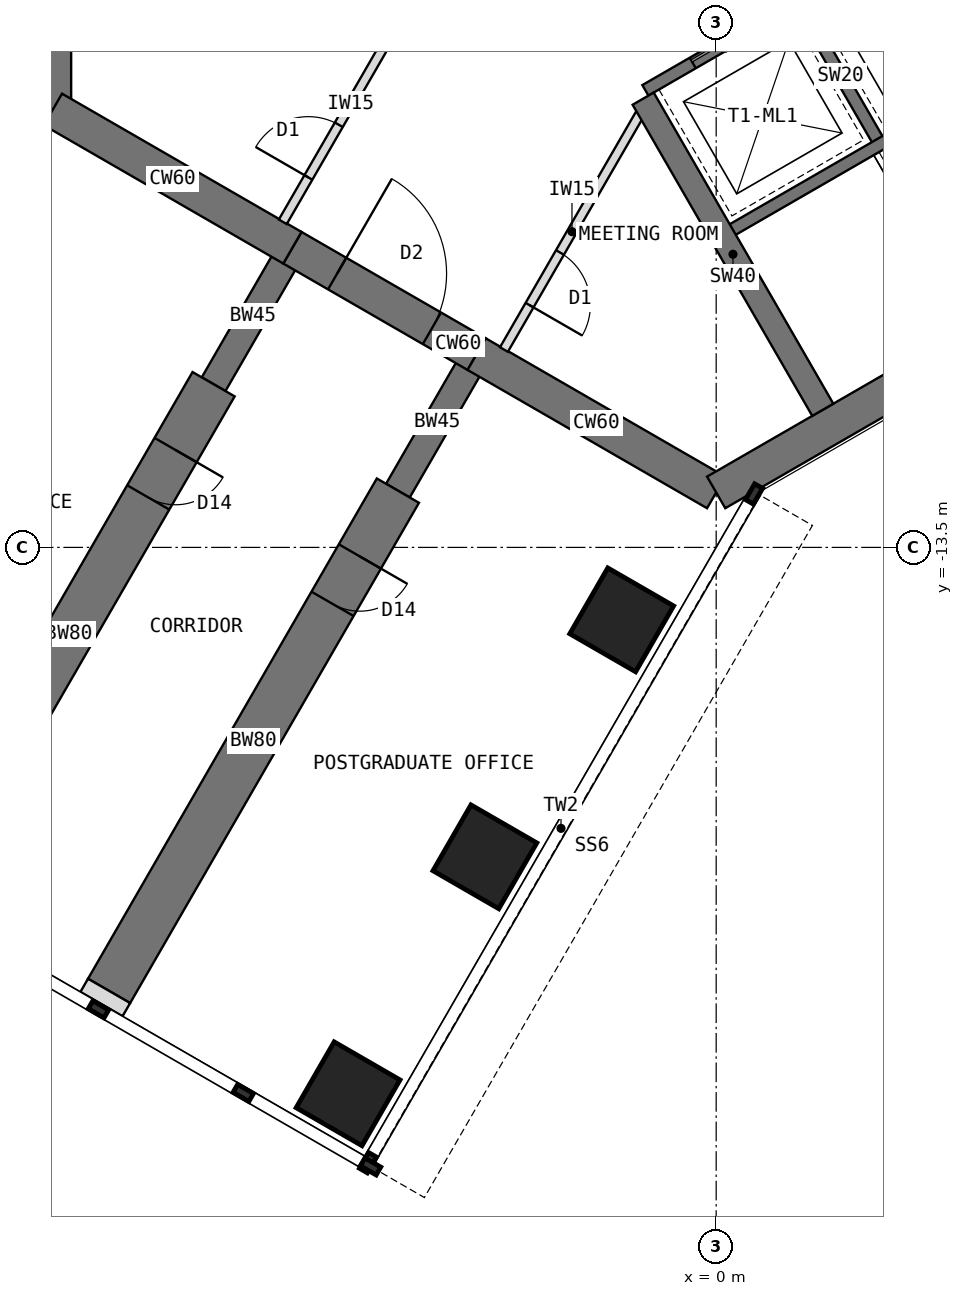
"""IFC4 building model, lengths in metres.
Left out: names, types, materials, properties, quantities, classifications, styles, units other than length and angle.
Written with IfcOpenShell. Run it as: python <this file> out.ifc"""

import sys

from ifc_helpers import new_model, si_unit, direction, frame, frame_2d, origin, origin_2d, place, context, subcontext, project, spatial, rectangle, extrude, element, fill, save


model = new_model("IFC4")
c1 = context("Model", 3, precision=1e-05, world=origin(), true_north=direction((0.0, 1.0)))
c2 = subcontext(c1, "Body", "Model", "MODEL_VIEW")
j1 = project(units=[si_unit("LENGTHUNIT", "METRE"), si_unit("PLANEANGLEUNIT", "RADIAN")], contexts=[c1])
p1 = place(None, origin())
s1 = spatial("IfcSite", under=j1, at=p1, CompositionType="ELEMENT")
p2 = place(p1, origin())
s2 = spatial("IfcBuilding", under=s1, at=p2, CompositionType="ELEMENT")
p3 = place(p2, frame((0.0, 0.0, 157.5)))
s3 = spatial("IfcBuildingStorey", under=s2, at=p3, CompositionType="ELEMENT", Elevation=157.5)
p4 = place(p3, frame((-10.908, 6.298, 0.0), z_axis=(0.0, 0.0, 1.0), x_axis=(0.0, -1.0, 0.0)))
e1 = element("IfcWall", 1, at=p4, inside=s3, PredefinedType="SHEAR", context=c2, shape_type="SweptSolid", body=[
    extrude(rectangle(XDim=12.596, YDim=0.6, at=frame_2d((6.298, 0.0))), origin(), (0.0, 0.0, 1.0), 4.0),
])
p5 = place(p3, frame((-10.908, -6.298, 0.0), z_axis=(0.0, 0.0, 1.0), x_axis=(0.866034513004, -0.499984222037, 0.0)))
e2 = element("IfcWall", 2, at=p5, inside=s3, PredefinedType="SHEAR", context=c2, shape_type="SweptSolid", body=[
    extrude(rectangle(XDim=4.548, YDim=0.6, at=frame_2d((2.274, 0.0))), origin(), (0.0, 0.0, 1.0), 4.0),
])
p6 = place(p3, frame((-6.97, -8.572, 0.0), z_axis=(0.0, 0.0, 1.0), x_axis=(0.866019471182, -0.500010275428, 0.0)))
e3 = element("IfcWall", 3, at=p6, inside=s3, PredefinedType="SHEAR", context=c2, shape_type="SweptSolid", body=[
    extrude(rectangle(XDim=3.5, YDim=0.6, at=frame_2d((1.75, 0.0))), origin(), (0.0, 0.0, 1.0), 4.0),
])
p7 = place(p6, frame((0.85, 0.0, 0.0)))
e4 = element("IfcOpeningElement", 4, at=p7, cuts=e3, PredefinedType="OPENING", context=c2, shape_type="SweptSolid", body=[
    extrude(rectangle(XDim=1.8, YDim=2.1, at=frame_2d((0.9, 1.05))), frame((0.0, 0.31, 0.0), z_axis=(0.0, -1.0, 0.0), x_axis=(1.0, 0.0, 0.0)), (0.0, 0.0, 1.0), 0.62),
])
p8 = place(p3, frame((-3.939, -10.322, 0.0), z_axis=(0.0, 0.0, 1.0), x_axis=(0.866011268655, -0.500024481964, 0.0)))
e5 = element("IfcWall", 5, at=p8, inside=s3, PredefinedType="SHEAR", context=c2, shape_type="SweptSolid", body=[
    extrude(rectangle(XDim=4.548, YDim=0.6, at=frame_2d((2.274, 0.0))), origin(), (0.0, 0.0, 1.0), 4.0),
])
p9 = place(p3, frame((0.0, -12.596, 0.0), z_axis=(0.0, 0.0, 1.0), x_axis=(0.866021940709, 0.500005998175, 0.0)))
e6 = element("IfcWall", 6, at=p9, inside=s3, PredefinedType="SHEAR", context=c2, shape_type="SweptSolid", body=[
    extrude(rectangle(XDim=12.596, YDim=0.6, at=frame_2d((6.298, 0.0))), origin(), (0.0, 0.0, 1.0), 4.0),
])
p10 = place(p3, frame((-3.939, -10.322, 0.0), z_axis=(0.0, 0.0, 1.0), x_axis=(-0.499918158782, -0.866072649678, 0.0)))
e7 = element("IfcWall", 7, at=p10, inside=s3, PredefinedType="SHEAR", context=c2, shape_type="SweptSolid", body=[
    extrude(rectangle(XDim=2.592, YDim=0.45, at=frame_2d((1.296, 0.0))), origin(), (0.0, 0.0, 1.0), 4.0),
])
p11 = place(p3, frame((-5.234, -12.566, 0.0), z_axis=(0.0, 0.0, 1.0), x_axis=(-0.499997557548, -0.86602681393, 0.0)))
e8 = element("IfcWall", 8, at=p11, inside=s3, PredefinedType="SHEAR", context=c2, shape_type="SweptSolid", body=[
    extrude(rectangle(XDim=9.5, YDim=0.8, at=frame_2d((4.75, 0.0))), origin(), (0.0, 0.0, 1.0), 4.0),
])
p12 = place(p11, frame((1.25, 0.0, 0.0)))
e9 = element("IfcOpeningElement", 9, at=p12, cuts=e8, PredefinedType="OPENING", context=c2, shape_type="SweptSolid", body=[
    extrude(rectangle(XDim=0.9, YDim=2.1, at=frame_2d((0.45, 1.05))), frame((0.0, 0.41, 0.0), z_axis=(0.0, -1.0, 0.0), x_axis=(1.0, 0.0, 0.0)), (0.0, 0.0, 1.0), 0.82),
])
p13 = place(p3, frame((-6.97, -8.572, 0.0), z_axis=(0.0, 0.0, 1.0), x_axis=(-0.499988811324, -0.866031863473, 0.0)))
e10 = element("IfcWall", 10, at=p13, inside=s3, PredefinedType="SHEAR", context=c2, shape_type="SweptSolid", body=[
    extrude(rectangle(XDim=2.592, YDim=0.45, at=frame_2d((1.296, 0.0))), origin(), (0.0, 0.0, 1.0), 4.0),
])
p14 = place(p3, frame((-8.266, -10.816, 0.0), z_axis=(0.0, 0.0, 1.0), x_axis=(-0.499997557548, -0.86602681393, 0.0)))
e11 = element("IfcWall", 11, at=p14, inside=s3, PredefinedType="SHEAR", context=c2, shape_type="SweptSolid", body=[
    extrude(rectangle(XDim=9.5, YDim=0.8, at=frame_2d((4.75, 0.0))), origin(), (0.0, 0.0, 1.0), 4.0),
])
p15 = place(p14, frame((1.25, 0.0, 0.0)))
e12 = element("IfcOpeningElement", 12, at=p15, cuts=e11, PredefinedType="OPENING", context=c2, shape_type="SweptSolid", body=[
    extrude(rectangle(XDim=0.9, YDim=2.1, at=frame_2d((0.45, 1.05))), frame((0.0, 0.41, 0.0), z_axis=(0.0, -1.0, 0.0), x_axis=(1.0, 0.0, 0.0)), (0.0, 0.0, 1.0), 0.82),
])
for number, where, z_axis, x_axis in (
    (13, (-1.554, -14.691, 0.0), (0.0, 0.0, 1.0), (0.5, 0.866, 0.0)),
    (14, (-3.804, -18.588, 0.0), (0.0, 0.0, 1.0), (0.5, 0.866, 0.0)),
    (15, (-6.054, -22.486, 0.0), (0.0, 0.0, 1.0), (0.5, 0.866, 0.0)),
):
    element("IfcColumn", number, at=place(p3, frame(where, z_axis=z_axis, x_axis=x_axis)), inside=s3, PredefinedType="COLUMN", context=c2, shape_type="SweptSolid", body=[
        extrude(rectangle(XDim=1.25, YDim=1.25, at=origin_2d()), origin(), (0.0, 0.0, 1.0), 4.0),
    ])
p16 = place(p3, frame((-9.984, -20.794, 0.0), z_axis=(0.0, 0.0, 1.0), x_axis=(-0.500342721131, -0.865827443207, 0.0)))
e16 = element("IfcWall", 16, at=p16, inside=s3, PredefinedType="PARTITIONING", context=c2, shape_type="SweptSolid", body=[
    extrude(rectangle(XDim=0.25, YDim=0.8, at=frame_2d((0.125, 0.0))), origin(), (0.0, 0.0, 1.0), 3.8),
])
p17 = place(p3, frame((-1.164, -5.984, 0.0), z_axis=(0.0, 0.0, 1.0), x_axis=(0.866026010844, 0.49999894854, 0.0)))
e17 = element("IfcWall", 17, at=p17, inside=s3, PredefinedType="SHEAR", context=c2, shape_type="SweptSolid", body=[
    extrude(rectangle(XDim=8.0, YDim=0.2, at=frame_2d((4.0, 0.0))), origin(), (0.0, 0.0, 1.0), 4.0),
])
p18 = place(p17, frame((6.3, 0.0, 0.0)))
e18 = element("IfcOpeningElement", 18, at=p18, cuts=e17, PredefinedType="OPENING", context=c2, shape_type="SweptSolid", body=[
    extrude(rectangle(XDim=1.2, YDim=2.1, at=frame_2d((0.6, 1.05))), frame((0.0, 0.11, 0.0), z_axis=(0.0, -1.0, 0.0), x_axis=(1.0, 0.0, 0.0)), (0.0, 0.0, 1.0), 0.22),
])
p19 = place(p17, frame((0.9, 0.0, 0.0)))
e19 = element("IfcOpeningElement", 19, at=p19, cuts=e17, PredefinedType="OPENING", context=c2, shape_type="SweptSolid", body=[
    extrude(rectangle(XDim=1.1, YDim=2.2, at=frame_2d((0.55, 1.1))), frame((0.0, 0.11, 0.0), z_axis=(0.0, -1.0, 0.0), x_axis=(1.0, 0.0, 0.0)), (0.0, 0.0, 1.0), 0.22),
])
p20 = place(p17, frame((3.8, 0.0, 0.0)))
e20 = element("IfcOpeningElement", 20, at=p20, cuts=e17, PredefinedType="OPENING", context=c2, shape_type="SweptSolid", body=[
    extrude(rectangle(XDim=1.1, YDim=2.2, at=frame_2d((0.55, 1.1))), frame((0.0, 0.11, 0.0), z_axis=(0.0, -1.0, 0.0), x_axis=(1.0, 0.0, 0.0)), (0.0, 0.0, 1.0), 0.22),
])
p21 = place(p3, frame((1.397, -4.62, 0.0), z_axis=(0.0, 0.0, 1.0), x_axis=(0.499936506574, -0.866062058628, 0.0)))
e21 = element("IfcWall", 21, at=p21, inside=s3, PredefinedType="SHEAR", context=c2, shape_type="SweptSolid", body=[
    extrude(rectangle(XDim=2.6, YDim=0.2, at=frame_2d((1.3, 0.0))), origin(), (0.0, 0.0, 1.0), 4.0),
])
p22 = place(p3, frame((0.186, -8.322, 0.0), z_axis=(0.0, 0.0, 1.0), x_axis=(0.866026010844, 0.49999894854, 0.0)))
e22 = element("IfcWall", 22, at=p22, inside=s3, PredefinedType="SHEAR", context=c2, shape_type="SweptSolid", body=[
    extrude(rectangle(XDim=8.0, YDim=0.2, at=frame_2d((4.0, 0.0))), origin(), (0.0, 0.0, 1.0), 4.0),
])
p23 = place(p22, frame((6.7, 0.0, 0.0)))
e23 = element("IfcOpeningElement", 23, at=p23, cuts=e22, PredefinedType="OPENING", context=c2, shape_type="SweptSolid", body=[
    extrude(rectangle(XDim=1.1, YDim=2.1, at=frame_2d((0.55, 1.05))), frame((0.0, 0.11, 0.0), z_axis=(0.0, -1.0, 0.0), x_axis=(1.0, 0.0, 0.0)), (0.0, 0.0, 1.0), 0.22),
])
p24 = place(p3, frame((-1.201, -6.12, 0.0), z_axis=(0.0, 0.0, 1.0), x_axis=(0.49999668571, -0.866027317282, 0.0)))
e24 = element("IfcWall", 24, at=p24, inside=s3, PredefinedType="SHEAR", context=c2, shape_type="SweptSolid", body=[
    extrude(rectangle(XDim=5.908, YDim=0.4, at=frame_2d((2.954, 0.0))), origin(), (0.0, 0.0, 1.0), 4.0),
])
p25 = place(p3, frame((-1.253, -6.37, 0.0), z_axis=(0.0, 0.0, 1.0), x_axis=(-0.499999473313, -0.866025707867, 0.0)))
e25 = element("IfcWall", 25, at=p25, inside=s3, PredefinedType="PARTITIONING", context=c2, shape_type="SweptSolid", body=[
    extrude(rectangle(XDim=4.476, YDim=0.15, at=frame_2d((2.238, 0.0))), origin(), (0.0, 0.0, 1.0), 3.8),
])
p26 = place(p25, frame((2.633, 0.0, 0.0)))
e26 = element("IfcOpeningElement", 26, at=p26, cuts=e25, PredefinedType="OPENING", context=c2, shape_type="SweptSolid", body=[
    extrude(rectangle(XDim=1.0, YDim=2.1, at=frame_2d((0.5, 1.05))), frame((0.0, 0.085, 0.0), z_axis=(0.0, -1.0, 0.0), x_axis=(1.0, 0.0, 0.0)), (0.0, 0.0, 1.0), 0.17),
])
p27 = place(p3, frame((-7.128, -8.146, 0.0), z_axis=(0.0, 0.0, 1.0), x_axis=(0.499999473313, 0.866025707867, 0.0)))
e27 = element("IfcWall", 27, at=p27, inside=s3, PredefinedType="PARTITIONING", context=c2, shape_type="SweptSolid", body=[
    extrude(rectangle(XDim=4.476, YDim=0.15, at=frame_2d((2.238, 0.0))), origin(), (0.0, 0.0, 1.0), 3.8),
])
p28 = place(p27, frame((0.843, 0.0, 0.0)))
e28 = element("IfcOpeningElement", 28, at=p28, cuts=e27, PredefinedType="OPENING", context=c2, shape_type="SweptSolid", body=[
    extrude(rectangle(XDim=1.0, YDim=2.1, at=frame_2d((0.5, 1.05))), frame((0.0, 0.085, 0.0), z_axis=(0.0, -1.0, 0.0), x_axis=(1.0, 0.0, 0.0)), (0.0, 0.0, 1.0), 0.17),
])
p29 = place(p19, origin())
e29 = element("IfcDoor", 29, at=p29, inside=s3, OperationType="DOUBLE_DOOR_SLIDING", PredefinedType="DOOR", context=c2, shape_type="SweptSolid", body=[
    extrude(rectangle(XDim=1.1, YDim=2.2, at=frame_2d((0.55, 1.1))), frame((0.0, 0.025, 0.0), z_axis=(0.0, -1.0, 0.0), x_axis=(1.0, 0.0, 0.0)), (0.0, 0.0, 1.0), 0.05),
])
fill(e19, e29)
p30 = place(p7, origin())
e30 = element("IfcDoor", 30, at=p30, inside=s3, OperationType="DOUBLE_DOOR_DOUBLE_SWING", PredefinedType="DOOR", context=c2, shape_type="SweptSolid", body=[
    extrude(rectangle(XDim=1.72, YDim=2.06, at=frame_2d((0.9, 1.03))), frame((0.0, 0.025, 0.0), z_axis=(0.0, -1.0, 0.0), x_axis=(1.0, 0.0, 0.0)), (0.0, 0.0, 1.0), 0.05),
    extrude(rectangle(XDim=0.04, YDim=2.1, at=frame_2d((0.02, 1.05))), frame((0.0, 0.3, 0.0), z_axis=(0.0, -1.0, 0.0), x_axis=(1.0, 0.0, 0.0)), (0.0, 0.0, 1.0), 0.6),
    extrude(rectangle(XDim=0.04, YDim=2.1, at=frame_2d((1.78, 1.05))), frame((0.0, 0.3, 0.0), z_axis=(0.0, -1.0, 0.0), x_axis=(1.0, 0.0, 0.0)), (0.0, 0.0, 1.0), 0.6),
    extrude(rectangle(XDim=1.72, YDim=0.04, at=frame_2d((0.9, 2.08))), frame((0.0, 0.3, 0.0), z_axis=(0.0, -1.0, 0.0), x_axis=(1.0, 0.0, 0.0)), (0.0, 0.0, 1.0), 0.6),
])
fill(e4, e30)
p31 = place(p28, origin())
e31 = element("IfcDoor", 31, at=p31, inside=s3, OperationType="SINGLE_SWING_LEFT", PredefinedType="DOOR", context=c2, shape_type="SweptSolid", body=[
    extrude(rectangle(XDim=1.0, YDim=2.1, at=frame_2d((0.5, 1.05))), frame((0.0, 0.025, 0.0), z_axis=(0.0, -1.0, 0.0), x_axis=(1.0, 0.0, 0.0)), (0.0, 0.0, 1.0), 0.05),
])
fill(e28, e31)
p32 = place(p26, origin())
e32 = element("IfcDoor", 32, at=p32, inside=s3, OperationType="SINGLE_SWING_RIGHT", PredefinedType="DOOR", context=c2, shape_type="SweptSolid", body=[
    extrude(rectangle(XDim=1.0, YDim=2.1, at=frame_2d((0.5, 1.05))), frame((0.0, 0.025, 0.0), z_axis=(0.0, -1.0, 0.0), x_axis=(1.0, 0.0, 0.0)), (0.0, 0.0, 1.0), 0.05),
])
fill(e26, e32)
p33 = place(p12, origin())
e33 = element("IfcDoor", 33, at=p33, inside=s3, OperationType="SINGLE_SWING_LEFT", PredefinedType="DOOR", context=c2, shape_type="SweptSolid", body=[
    extrude(rectangle(XDim=0.82, YDim=2.06, at=frame_2d((0.45, 1.03))), frame((0.0, 0.025, 0.0), z_axis=(0.0, -1.0, 0.0), x_axis=(1.0, 0.0, 0.0)), (0.0, 0.0, 1.0), 0.05),
    extrude(rectangle(XDim=0.04, YDim=2.1, at=frame_2d((0.02, 1.05))), frame((0.0, 0.4, 0.0), z_axis=(0.0, -1.0, 0.0), x_axis=(1.0, 0.0, 0.0)), (0.0, 0.0, 1.0), 0.8),
    extrude(rectangle(XDim=0.04, YDim=2.1, at=frame_2d((0.88, 1.05))), frame((0.0, 0.4, 0.0), z_axis=(0.0, -1.0, 0.0), x_axis=(1.0, 0.0, 0.0)), (0.0, 0.0, 1.0), 0.8),
    extrude(rectangle(XDim=0.82, YDim=0.04, at=frame_2d((0.45, 2.08))), frame((0.0, 0.4, 0.0), z_axis=(0.0, -1.0, 0.0), x_axis=(1.0, 0.0, 0.0)), (0.0, 0.0, 1.0), 0.8),
])
fill(e9, e33)
p34 = place(p15, origin())
e34 = element("IfcDoor", 34, at=p34, inside=s3, OperationType="SINGLE_SWING_LEFT", PredefinedType="DOOR", context=c2, shape_type="SweptSolid", body=[
    extrude(rectangle(XDim=0.82, YDim=2.06, at=frame_2d((0.45, 1.03))), frame((0.0, 0.025, 0.0), z_axis=(0.0, -1.0, 0.0), x_axis=(1.0, 0.0, 0.0)), (0.0, 0.0, 1.0), 0.05),
    extrude(rectangle(XDim=0.04, YDim=2.1, at=frame_2d((0.02, 1.05))), frame((0.0, 0.4, 0.0), z_axis=(0.0, -1.0, 0.0), x_axis=(1.0, 0.0, 0.0)), (0.0, 0.0, 1.0), 0.8),
    extrude(rectangle(XDim=0.04, YDim=2.1, at=frame_2d((0.88, 1.05))), frame((0.0, 0.4, 0.0), z_axis=(0.0, -1.0, 0.0), x_axis=(1.0, 0.0, 0.0)), (0.0, 0.0, 1.0), 0.8),
    extrude(rectangle(XDim=0.82, YDim=0.04, at=frame_2d((0.45, 2.08))), frame((0.0, 0.4, 0.0), z_axis=(0.0, -1.0, 0.0), x_axis=(1.0, 0.0, 0.0)), (0.0, 0.0, 1.0), 0.8),
])
fill(e12, e34)
save(model, sys.argv[1])
